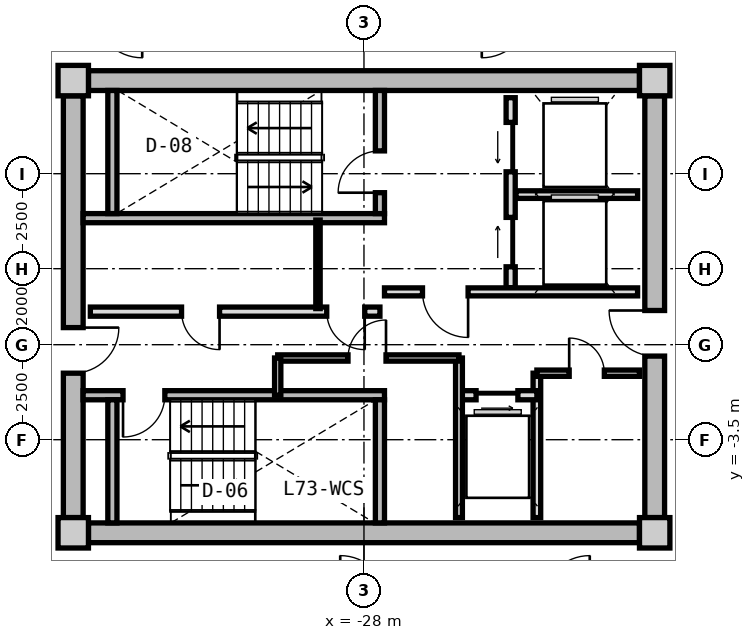
"""IFC4 building model, lengths in metres.
Left out: names, types, materials, properties, quantities, classifications, styles, units other than length and angle.
Written with IfcOpenShell. Run it as: python <this file> out.ifc"""

import sys

from ifc_helpers import new_model, si_unit, direction, frame, frame_2d, origin, origin_2d, place, context, subcontext, project, spatial, rectangle, extrude, source, transform, mapped, element, fill, save


model = new_model("IFC4")
c1 = context("Model", 3, precision=1e-05, world=origin(), true_north=direction((0.0, 1.0)))
c2 = subcontext(c1, "Body", "Model", "MODEL_VIEW")
j1 = project(units=[si_unit("LENGTHUNIT", "METRE"), si_unit("PLANEANGLEUNIT", "RADIAN")], contexts=[c1])
p1 = place(None, origin())
s1 = spatial("IfcSite", under=j1, at=p1, CompositionType="ELEMENT")
p2 = place(p1, origin())
s2 = spatial("IfcBuilding", under=s1, at=p2, CompositionType="ELEMENT")
p3 = place(p2, frame((0.0, 0.0, 235.25)))
s3 = spatial("IfcBuildingStorey", under=s2, at=p3, CompositionType="ELEMENT", Elevation=235.25)
m1 = source(origin(), c2, "Body", "SweptSolid", [
    extrude(rectangle(XDim=0.8, YDim=0.8, at=origin_2d()), origin(), (0.0, 0.0, 1.0), 3.05),
])
for number, where, z_axis, x_axis in (
    (1, (-35.65, -5.95, 0.0), (0.0, 0.0, 1.0), (1.0, 0.0, 0.0)),
    (2, (-20.35, -5.95, 0.0), (0.0, 0.0, 1.0), (1.0, 0.0, 0.0)),
    (3, (-20.35, 5.95, 0.0), (0.0, 0.0, 1.0), (1.0, 0.0, 0.0)),
    (4, (-35.65, 5.95, 0.0), (0.0, 0.0, 1.0), (1.0, 0.0, 0.0)),
):
    element("IfcColumn", number, at=place(p3, frame(where, z_axis=z_axis, x_axis=x_axis)), inside=s3, PredefinedType="COLUMN", context=c2, shape_type="MappedRepresentation", body=[
        mapped(m1, transform((0.0, 0.0, 0.0), x_axis=(1.0, 0.0, 0.0), y_axis=(0.0, 1.0, 0.0), z_axis=(0.0, 0.0, 1.0), scale=1.0)),
    ])
m2 = source(origin(), c2, "Body", "SweptSolid", [
    extrude(rectangle(XDim=14.5, YDim=0.52, at=frame_2d((7.25, 0.0))), origin(), (0.0, 0.0, 1.0), 2.81),
])
for number, where, z_axis, x_axis in (
    (5, (-35.25, 5.95, 0.0), (0.0, 0.0, 1.0), (1.0, 0.0, 0.0)),
    (6, (-20.75, -5.95, 0.0), (0.0, 0.0, 1.0), (-1.0, 0.0, 0.0)),
):
    element("IfcWall", number, at=place(p3, frame(where, z_axis=z_axis, x_axis=x_axis)), inside=s3, PredefinedType="SHEAR", context=c2, shape_type="MappedRepresentation", body=[
        mapped(m2, transform((0.0, 0.0, 0.0), x_axis=(1.0, 0.0, 0.0), y_axis=(0.0, 1.0, 0.0), z_axis=(0.0, 0.0, 1.0), scale=1.0)),
    ])
m3 = source(origin(), c2, "Body", "SweptSolid", [
    extrude(rectangle(XDim=11.1, YDim=0.52, at=frame_2d((5.55, 0.0))), origin(), (0.0, 0.0, 1.0), 2.81),
])
p4 = place(p3, frame((-35.65, -5.55, 0.0), z_axis=(0.0, 0.0, 1.0), x_axis=(0.0, 1.0, 0.0)))
e7 = element("IfcWall", 7, at=p4, inside=s3, PredefinedType="SHEAR", context=c2, shape_type="MappedRepresentation", body=[
    mapped(m3, transform((0.0, 0.0, 0.0), x_axis=(1.0, 0.0, 0.0), y_axis=(0.0, 1.0, 0.0), z_axis=(0.0, 0.0, 1.0), scale=1.0)),
])
p5 = place(p4, frame((3.8, 0.0, 0.0)))
e8 = element("IfcOpeningElement", 8, at=p5, cuts=e7, PredefinedType="OPENING", context=c2, shape_type="SweptSolid", body=[
    extrude(rectangle(XDim=1.2, YDim=2.15, at=frame_2d((0.6, 1.075))), frame((0.0, 0.27, 0.0), z_axis=(0.0, -1.0, 0.0), x_axis=(1.0, 0.0, 0.0)), (0.0, 0.0, 1.0), 0.54),
])
p6 = place(p3, frame((-20.35, 5.55, 0.0), z_axis=(0.0, 0.0, 1.0), x_axis=(0.0, -1.0, 0.0)))
e9 = element("IfcWall", 9, at=p6, inside=s3, PredefinedType="SHEAR", context=c2, shape_type="MappedRepresentation", body=[
    mapped(m3, transform((0.0, 0.0, 0.0), x_axis=(1.0, 0.0, 0.0), y_axis=(0.0, 1.0, 0.0), z_axis=(0.0, 0.0, 1.0), scale=1.0)),
])
p7 = place(p6, frame((5.65, 0.0, 0.0)))
e10 = element("IfcOpeningElement", 10, at=p7, cuts=e9, PredefinedType="OPENING", context=c2, shape_type="SweptSolid", body=[
    extrude(rectangle(XDim=1.2, YDim=2.15, at=frame_2d((0.6, 1.075))), frame((0.0, 0.27, 0.0), z_axis=(0.0, -1.0, 0.0), x_axis=(1.0, 0.0, 0.0)), (0.0, 0.0, 1.0), 0.54),
])
m4 = source(origin(), c2, "Body", "SweptSolid", [
    extrude(rectangle(XDim=7.93, YDim=0.24, at=frame_2d((3.965, 0.0))), origin(), (0.0, 0.0, 1.0), 2.81),
])
p8 = place(p3, frame((-35.39, 2.33, 0.0), z_axis=(0.0, 0.0, 1.0), x_axis=(1.0, 0.0, 0.0)))
e11 = element("IfcWall", 11, at=p8, inside=s3, PredefinedType="PARTITIONING", context=c2, shape_type="MappedRepresentation", body=[
    mapped(m4, transform((0.0, 0.0, 0.0), x_axis=(1.0, 0.0, 0.0), y_axis=(0.0, 1.0, 0.0), z_axis=(0.0, 0.0, 1.0), scale=1.0)),
])
m5 = source(origin(), c2, "Body", "SweptSolid", [
    extrude(rectangle(XDim=3.24, YDim=0.24, at=frame_2d((1.62, 0.0))), origin(), (0.0, 0.0, 1.0), 2.81),
])
p9 = place(p3, frame((-34.62, 2.45, 0.0), z_axis=(0.0, 0.0, 1.0), x_axis=(0.0, 1.0, 0.0)))
e12 = element("IfcWall", 12, at=p9, inside=s3, PredefinedType="PARTITIONING", context=c2, shape_type="MappedRepresentation", body=[
    mapped(m5, transform((0.0, 0.0, 0.0), x_axis=(1.0, 0.0, 0.0), y_axis=(0.0, 1.0, 0.0), z_axis=(0.0, 0.0, 1.0), scale=1.0)),
])
p10 = place(p3, frame((-27.58, 2.45, 0.0), z_axis=(0.0, 0.0, 1.0), x_axis=(0.0, 1.0, 0.0)))
e13 = element("IfcWall", 13, at=p10, inside=s3, PredefinedType="PARTITIONING", context=c2, shape_type="MappedRepresentation", body=[
    mapped(m5, transform((0.0, 0.0, 0.0), x_axis=(1.0, 0.0, 0.0), y_axis=(0.0, 1.0, 0.0), z_axis=(0.0, 0.0, 1.0), scale=1.0)),
])
p11 = place(p10, frame((0.55, 0.0, 0.0)))
e14 = element("IfcOpeningElement", 14, at=p11, cuts=e13, PredefinedType="OPENING", context=c2, shape_type="SweptSolid", body=[
    extrude(rectangle(XDim=1.1, YDim=2.15, at=frame_2d((0.55, 1.075))), frame((0.0, 0.13, 0.0), z_axis=(0.0, -1.0, 0.0), x_axis=(1.0, 0.0, 0.0)), (0.0, 0.0, 1.0), 0.26),
])
p12 = place(p3, frame((-35.39, -2.33, 0.0), z_axis=(0.0, 0.0, 1.0), x_axis=(1.0, 0.0, 0.0)))
e15 = element("IfcWall", 15, at=p12, inside=s3, PredefinedType="PARTITIONING", context=c2, shape_type="MappedRepresentation", body=[
    mapped(m4, transform((0.0, 0.0, 0.0), x_axis=(1.0, 0.0, 0.0), y_axis=(0.0, 1.0, 0.0), z_axis=(0.0, 0.0, 1.0), scale=1.0)),
])
p13 = place(p12, frame((1.05, 0.0, 0.0)))
e16 = element("IfcOpeningElement", 16, at=p13, cuts=e15, PredefinedType="OPENING", context=c2, shape_type="SweptSolid", body=[
    extrude(rectangle(XDim=1.1, YDim=2.15, at=frame_2d((0.55, 1.075))), frame((0.0, 0.13, 0.0), z_axis=(0.0, -1.0, 0.0), x_axis=(1.0, 0.0, 0.0)), (0.0, 0.0, 1.0), 0.26),
])
for number, where, z_axis, x_axis in (
    (17, (-34.62, -5.69, 0.0), (0.0, 0.0, 1.0), (0.0, 1.0, 0.0)),
    (18, (-27.58, -5.69, 0.0), (0.0, 0.0, 1.0), (0.0, 1.0, 0.0)),
):
    element("IfcWall", number, at=place(p3, frame(where, z_axis=z_axis, x_axis=x_axis)), inside=s3, PredefinedType="PARTITIONING", context=c2, shape_type="MappedRepresentation", body=[
        mapped(m5, transform((0.0, 0.0, 0.0), x_axis=(1.0, 0.0, 0.0), y_axis=(0.0, 1.0, 0.0), z_axis=(0.0, 0.0, 1.0), scale=1.0)),
    ])
m6 = source(origin(), c2, "Body", "SweptSolid", [
    extrude(rectangle(XDim=5.0, YDim=0.24, at=frame_2d((2.5, 0.0))), origin(), (0.0, 0.0, 1.0), 2.795),
])
p14 = place(p3, frame((-24.14, 0.5, 0.0), z_axis=(0.0, 0.0, 1.0), x_axis=(0.0, 1.0, 0.0)))
e19 = element("IfcWall", 19, at=p14, inside=s3, PredefinedType="PARTITIONING", context=c2, shape_type="MappedRepresentation", body=[
    mapped(m6, transform((0.0, 0.0, 0.0), x_axis=(1.0, 0.0, 0.0), y_axis=(0.0, 1.0, 0.0), z_axis=(0.0, 0.0, 1.0), scale=1.0)),
])
p15 = place(p14, frame((3.05, 0.0, 0.0)))
e20 = element("IfcOpeningElement", 20, at=p15, cuts=e19, PredefinedType="OPENING", context=c2, shape_type="SweptSolid", body=[
    extrude(rectangle(XDim=1.3, YDim=2.2, at=frame_2d((0.65, 1.1))), frame((0.0, 0.13, 0.0), z_axis=(0.0, -1.0, 0.0), x_axis=(1.0, 0.0, 0.0)), (0.0, 0.0, 1.0), 0.26),
])
p16 = place(p14, frame((0.55, 0.0, 0.0)))
e21 = element("IfcOpeningElement", 21, at=p16, cuts=e19, PredefinedType="OPENING", context=c2, shape_type="SweptSolid", body=[
    extrude(rectangle(XDim=1.3, YDim=2.2, at=frame_2d((0.65, 1.1))), frame((0.0, 0.13, 0.0), z_axis=(0.0, -1.0, 0.0), x_axis=(1.0, 0.0, 0.0)), (0.0, 0.0, 1.0), 0.26),
])
m7 = source(origin(), c2, "Body", "SweptSolid", [
    extrude(rectangle(XDim=3.2, YDim=0.2, at=frame_2d((1.6, 0.0))), origin(), (0.0, 0.0, 1.0), 2.795),
])
p17 = place(p3, frame((-24.0, 2.95, 0.0), z_axis=(0.0, 0.0, 1.0), x_axis=(1.0, 0.0, 0.0)))
e22 = element("IfcWall", 22, at=p17, inside=s3, PredefinedType="PARTITIONING", context=c2, shape_type="MappedRepresentation", body=[
    mapped(m7, transform((0.0, 0.0, 0.0), x_axis=(1.0, 0.0, 0.0), y_axis=(0.0, 1.0, 0.0), z_axis=(0.0, 0.0, 1.0), scale=1.0)),
])
m8 = source(origin(), c2, "Body", "SweptSolid", [
    extrude(rectangle(XDim=6.66, YDim=0.21, at=frame_2d((3.33, 0.0))), origin(), (0.0, 0.0, 1.0), 2.795),
])
p18 = place(p3, frame((-27.46, 0.39, 0.0), z_axis=(0.0, 0.0, 1.0), x_axis=(1.0, 0.0, 0.0)))
e23 = element("IfcWall", 23, at=p18, inside=s3, PredefinedType="PARTITIONING", context=c2, shape_type="MappedRepresentation", body=[
    mapped(m8, transform((0.0, 0.0, 0.0), x_axis=(1.0, 0.0, 0.0), y_axis=(0.0, 1.0, 0.0), z_axis=(0.0, 0.0, 1.0), scale=1.0)),
])
p19 = place(p18, frame((1.0, 0.0, 0.0)))
e24 = element("IfcOpeningElement", 24, at=p19, cuts=e23, PredefinedType="OPENING", context=c2, shape_type="SweptSolid", body=[
    extrude(rectangle(XDim=1.2, YDim=2.15, at=frame_2d((0.6, 1.075))), frame((0.0, 0.115, 0.0), z_axis=(0.0, -1.0, 0.0), x_axis=(1.0, 0.0, 0.0)), (0.0, 0.0, 1.0), 0.23),
])
m9 = source(origin(), c2, "Body", "SweptSolid", [
    extrude(rectangle(XDim=7.62, YDim=0.24, at=frame_2d((3.81, 0.0))), origin(), (0.0, 0.0, 1.0), 2.795),
])
p20 = place(p3, frame((-35.2, -0.13, 0.0), z_axis=(0.0, 0.0, 1.0), x_axis=(1.0, 0.0, 0.0)))
e25 = element("IfcWall", 25, at=p20, inside=s3, PredefinedType="PARTITIONING", context=c2, shape_type="MappedRepresentation", body=[
    mapped(m9, transform((0.0, 0.0, 0.0), x_axis=(1.0, 0.0, 0.0), y_axis=(0.0, 1.0, 0.0), z_axis=(0.0, 0.0, 1.0), scale=1.0)),
])
p21 = place(p20, frame((6.22, 0.0, 0.0)))
e26 = element("IfcOpeningElement", 26, at=p21, cuts=e25, PredefinedType="OPENING", context=c2, shape_type="SweptSolid", body=[
    extrude(rectangle(XDim=1.0, YDim=2.1, at=frame_2d((0.5, 1.05))), frame((0.0, 0.13, 0.0), z_axis=(0.0, -1.0, 0.0), x_axis=(1.0, 0.0, 0.0)), (0.0, 0.0, 1.0), 0.26),
])
p22 = place(p20, frame((2.4, 0.0, 0.0)))
e27 = element("IfcOpeningElement", 27, at=p22, cuts=e25, PredefinedType="OPENING", context=c2, shape_type="SweptSolid", body=[
    extrude(rectangle(XDim=1.0, YDim=2.1, at=frame_2d((0.5, 1.05))), frame((0.0, 0.13, 0.0), z_axis=(0.0, -1.0, 0.0), x_axis=(1.0, 0.0, 0.0)), (0.0, 0.0, 1.0), 0.26),
])
m10 = source(origin(), c2, "Body", "SweptSolid", [
    extrude(rectangle(XDim=2.33, YDim=0.115, at=frame_2d((1.165, 0.0))), origin(), (0.0, 0.0, 1.0), 2.795),
])
p23 = place(p3, frame((-29.21, -0.05, 0.0), z_axis=(0.0, 0.0, 1.0), x_axis=(0.0, 1.0, 0.0)))
e28 = element("IfcWall", 28, at=p23, inside=s3, PredefinedType="PARTITIONING", context=c2, shape_type="MappedRepresentation", body=[
    mapped(m10, transform((0.0, 0.0, 0.0), x_axis=(1.0, 0.0, 0.0), y_axis=(0.0, 1.0, 0.0), z_axis=(0.0, 0.0, 1.0), scale=1.0)),
])
m11 = source(origin(), c2, "Body", "SweptSolid", [
    extrude(rectangle(XDim=3.8, YDim=0.2, at=frame_2d((1.9, 0.0))), origin(), (0.0, 0.0, 1.0), 2.795),
])
p24 = place(p3, frame((-23.45, -5.55, 0.0), z_axis=(0.0, 0.0, 1.0), x_axis=(0.0, 1.0, 0.0)))
e29 = element("IfcWall", 29, at=p24, inside=s3, PredefinedType="PARTITIONING", context=c2, shape_type="MappedRepresentation", body=[
    mapped(m11, transform((0.0, 0.0, 0.0), x_axis=(1.0, 0.0, 0.0), y_axis=(0.0, 1.0, 0.0), z_axis=(0.0, 0.0, 1.0), scale=1.0)),
])
m12 = source(origin(), c2, "Body", "SweptSolid", [
    extrude(rectangle(XDim=2.05, YDim=0.24, at=frame_2d((1.025, 0.0))), origin(), (0.0, 0.0, 1.0), 2.795),
])
p25 = place(p3, frame((-25.5, -2.33, 0.0), z_axis=(0.0, 0.0, 1.0), x_axis=(1.0, 0.0, 0.0)))
e30 = element("IfcWall", 30, at=p25, inside=s3, PredefinedType="PARTITIONING", context=c2, shape_type="MappedRepresentation", body=[
    mapped(m12, transform((0.0, 0.0, 0.0), x_axis=(1.0, 0.0, 0.0), y_axis=(0.0, 1.0, 0.0), z_axis=(0.0, 0.0, 1.0), scale=1.0)),
])
p26 = place(p25, frame((0.45, 0.0, 0.0)))
e31 = element("IfcOpeningElement", 31, at=p26, cuts=e30, PredefinedType="OPENING", context=c2, shape_type="SweptSolid", body=[
    extrude(rectangle(XDim=1.1, YDim=2.2, at=frame_2d((0.55, 1.1))), frame((0.0, 0.13, 0.0), z_axis=(0.0, -1.0, 0.0), x_axis=(1.0, 0.0, 0.0)), (0.0, 0.0, 1.0), 0.26),
])
m13 = source(origin(), c2, "Body", "SweptSolid", [
    extrude(rectangle(XDim=4.2, YDim=0.18, at=frame_2d((2.1, 0.0))), origin(), (0.0, 0.0, 1.0), 2.795),
])
p27 = place(p3, frame((-25.5, -5.55, 0.0), z_axis=(0.0, 0.0, 1.0), x_axis=(0.0, 1.0, 0.0)))
e32 = element("IfcWall", 32, at=p27, inside=s3, PredefinedType="PARTITIONING", context=c2, shape_type="MappedRepresentation", body=[
    mapped(m13, transform((0.0, 0.0, 0.0), x_axis=(1.0, 0.0, 0.0), y_axis=(0.0, 1.0, 0.0), z_axis=(0.0, 0.0, 1.0), scale=1.0)),
])
m14 = source(origin(), c2, "Body", "SweptSolid", [
    extrude(rectangle(XDim=4.77, YDim=0.165, at=frame_2d((2.385, 0.0))), origin(), (0.0, 0.0, 1.0), 2.795),
])
p28 = place(p3, frame((-30.27, -1.35, 0.0), z_axis=(0.0, 0.0, 1.0), x_axis=(1.0, 0.0, 0.0)))
e33 = element("IfcWall", 33, at=p28, inside=s3, PredefinedType="PARTITIONING", context=c2, shape_type="MappedRepresentation", body=[
    mapped(m14, transform((0.0, 0.0, 0.0), x_axis=(1.0, 0.0, 0.0), y_axis=(0.0, 1.0, 0.0), z_axis=(0.0, 0.0, 1.0), scale=1.0)),
])
p29 = place(p28, frame((1.85, 0.0, 0.0)))
e34 = element("IfcOpeningElement", 34, at=p29, cuts=e33, PredefinedType="OPENING", context=c2, shape_type="SweptSolid", body=[
    extrude(rectangle(XDim=1.0, YDim=2.1, at=frame_2d((0.5, 1.05))), frame((0.0, 0.093, 0.0), z_axis=(0.0, -1.0, 0.0), x_axis=(1.0, 0.0, 0.0)), (0.0, 0.0, 1.0), 0.185),
])
m15 = source(origin(), c2, "Body", "SweptSolid", [
    extrude(rectangle(XDim=0.98, YDim=0.165, at=frame_2d((0.49, 0.0))), origin(), (0.0, 0.0, 1.0), 2.795),
])
p30 = place(p3, frame((-30.27, -2.33, 0.0), z_axis=(0.0, 0.0, 1.0), x_axis=(0.0, 1.0, 0.0)))
e35 = element("IfcWall", 35, at=p30, inside=s3, PredefinedType="PARTITIONING", context=c2, shape_type="MappedRepresentation", body=[
    mapped(m15, transform((0.0, 0.0, 0.0), x_axis=(1.0, 0.0, 0.0), y_axis=(0.0, 1.0, 0.0), z_axis=(0.0, 0.0, 1.0), scale=1.0)),
])
m16 = source(origin(), c2, "Body", "SweptSolid", [
    extrude(rectangle(XDim=2.7, YDim=0.165, at=frame_2d((1.35, 0.0))), origin(), (0.0, 0.0, 1.0), 2.795),
])
p31 = place(p3, frame((-23.45, -1.75, 0.0), z_axis=(0.0, 0.0, 1.0), x_axis=(1.0, 0.0, 0.0)))
e36 = element("IfcWall", 36, at=p31, inside=s3, PredefinedType="PARTITIONING", context=c2, shape_type="MappedRepresentation", body=[
    mapped(m16, transform((0.0, 0.0, 0.0), x_axis=(1.0, 0.0, 0.0), y_axis=(0.0, 1.0, 0.0), z_axis=(0.0, 0.0, 1.0), scale=1.0)),
])
p32 = place(p31, frame((0.85, 0.0, 0.0)))
e37 = element("IfcOpeningElement", 37, at=p32, cuts=e36, PredefinedType="OPENING", context=c2, shape_type="SweptSolid", body=[
    extrude(rectangle(XDim=0.925, YDim=2.1, at=frame_2d((0.462, 1.05))), frame((0.0, 0.093, 0.0), z_axis=(0.0, -1.0, 0.0), x_axis=(1.0, 0.0, 0.0)), (0.0, 0.0, 1.0), 0.185),
])
m17 = source(origin(), c2, "Body", "SweptSolid", [
    extrude(rectangle(XDim=1.1, YDim=2.15, at=frame_2d((0.55, 1.075))), frame((0.0, 0.025, 0.0), z_axis=(0.0, -1.0, 0.0), x_axis=(1.0, 0.0, 0.0)), (0.0, 0.0, 1.0), 0.05),
])
p33 = place(p11, origin())
e38 = element("IfcDoor", 38, at=p33, inside=s3, OperationType="SINGLE_SWING_LEFT", PredefinedType="DOOR", context=c2, shape_type="MappedRepresentation", body=[
    mapped(m17, transform((0.0, 0.0, 0.0), x_axis=(1.0, 0.0, 0.0), y_axis=(0.0, 1.0, 0.0), z_axis=(0.0, 0.0, 1.0), scale=1.0)),
])
fill(e14, e38)
p34 = place(p13, frame((1.1, 0.0, 0.0), z_axis=(0.0, 0.0, 1.0), x_axis=(-1.0, 0.0, 0.0)))
e39 = element("IfcDoor", 39, at=p34, inside=s3, OperationType="SINGLE_SWING_RIGHT", PredefinedType="DOOR", context=c2, shape_type="MappedRepresentation", body=[
    mapped(m17, transform((0.0, 0.0, 0.0), x_axis=(1.0, 0.0, 0.0), y_axis=(0.0, 1.0, 0.0), z_axis=(0.0, 0.0, 1.0), scale=1.0)),
])
fill(e16, e39)
m18 = source(origin(), c2, "Body", "SweptSolid", [
    extrude(rectangle(XDim=1.3, YDim=2.2, at=frame_2d((0.65, 1.1))), frame((0.0, 0.025, 0.0), z_axis=(0.0, -1.0, 0.0), x_axis=(1.0, 0.0, 0.0)), (0.0, 0.0, 1.0), 0.05),
])
p35 = place(p15, origin())
e40 = element("IfcDoor", 40, at=p35, inside=s3, OperationType="SLIDING_TO_LEFT", PredefinedType="DOOR", context=c2, shape_type="MappedRepresentation", body=[
    mapped(m18, transform((0.0, 0.0, 0.0), x_axis=(1.0, 0.0, 0.0), y_axis=(0.0, 1.0, 0.0), z_axis=(0.0, 0.0, 1.0), scale=1.0)),
])
fill(e20, e40)
p36 = place(p16, origin())
e41 = element("IfcDoor", 41, at=p36, inside=s3, OperationType="SLIDING_TO_RIGHT", PredefinedType="DOOR", context=c2, shape_type="MappedRepresentation", body=[
    mapped(m18, transform((0.0, 0.0, 0.0), x_axis=(1.0, 0.0, 0.0), y_axis=(0.0, 1.0, 0.0), z_axis=(0.0, 0.0, 1.0), scale=1.0)),
])
fill(e21, e41)
m19 = source(origin(), c2, "Body", "SweptSolid", [
    extrude(rectangle(XDim=1.2, YDim=2.15, at=frame_2d((0.6, 1.075))), frame((0.0, 0.025, 0.0), z_axis=(0.0, -1.0, 0.0), x_axis=(1.0, 0.0, 0.0)), (0.0, 0.0, 1.0), 0.05),
])
p37 = place(p19, frame((1.2, 0.0, 0.0), z_axis=(0.0, 0.0, 1.0), x_axis=(-1.0, 0.0, 0.0)))
e42 = element("IfcDoor", 42, at=p37, inside=s3, OperationType="SINGLE_SWING_LEFT", PredefinedType="DOOR", context=c2, shape_type="MappedRepresentation", body=[
    mapped(m19, transform((0.0, 0.0, 0.0), x_axis=(1.0, 0.0, 0.0), y_axis=(0.0, 1.0, 0.0), z_axis=(0.0, 0.0, 1.0), scale=1.0)),
])
fill(e24, e42)
p38 = place(p5, frame((1.2, 0.0, 0.0), z_axis=(0.0, 0.0, 1.0), x_axis=(-1.0, 0.0, 0.0)))
e43 = element("IfcDoor", 43, at=p38, inside=s3, OperationType="SINGLE_SWING_LEFT", PredefinedType="DOOR", context=c2, shape_type="MappedRepresentation", body=[
    mapped(m19, transform((0.0, 0.0, 0.0), x_axis=(1.0, 0.0, 0.0), y_axis=(0.0, 1.0, 0.0), z_axis=(0.0, 0.0, 1.0), scale=1.0)),
])
fill(e8, e43)
p39 = place(p7, frame((1.2, 0.0, 0.0), z_axis=(0.0, 0.0, 1.0), x_axis=(-1.0, 0.0, 0.0)))
e44 = element("IfcDoor", 44, at=p39, inside=s3, OperationType="SINGLE_SWING_RIGHT", PredefinedType="DOOR", context=c2, shape_type="MappedRepresentation", body=[
    mapped(m19, transform((0.0, 0.0, 0.0), x_axis=(1.0, 0.0, 0.0), y_axis=(0.0, 1.0, 0.0), z_axis=(0.0, 0.0, 1.0), scale=1.0)),
])
fill(e10, e44)
m20 = source(origin(), c2, "Body", "SweptSolid", [
    extrude(rectangle(XDim=1.0, YDim=2.1, at=frame_2d((0.5, 1.05))), frame((0.0, 0.025, 0.0), z_axis=(0.0, -1.0, 0.0), x_axis=(1.0, 0.0, 0.0)), (0.0, 0.0, 1.0), 0.05),
])
p40 = place(p21, frame((1.0, 0.0, 0.0), z_axis=(0.0, 0.0, 1.0), x_axis=(-1.0, 0.0, 0.0)))
e45 = element("IfcDoor", 45, at=p40, inside=s3, OperationType="SINGLE_SWING_LEFT", PredefinedType="DOOR", context=c2, shape_type="MappedRepresentation", body=[
    mapped(m20, transform((0.0, 0.0, 0.0), x_axis=(1.0, 0.0, 0.0), y_axis=(0.0, 1.0, 0.0), z_axis=(0.0, 0.0, 1.0), scale=1.0)),
])
fill(e26, e45)
p41 = place(p22, frame((1.0, 0.0, 0.0), z_axis=(0.0, 0.0, 1.0), x_axis=(-1.0, 0.0, 0.0)))
e46 = element("IfcDoor", 46, at=p41, inside=s3, OperationType="SINGLE_SWING_LEFT", PredefinedType="DOOR", context=c2, shape_type="MappedRepresentation", body=[
    mapped(m20, transform((0.0, 0.0, 0.0), x_axis=(1.0, 0.0, 0.0), y_axis=(0.0, 1.0, 0.0), z_axis=(0.0, 0.0, 1.0), scale=1.0)),
])
fill(e27, e46)
m21 = source(origin(), c2, "Body", "SweptSolid", [
    extrude(rectangle(XDim=1.1, YDim=2.2, at=frame_2d((0.55, 1.1))), frame((0.0, 0.025, 0.0), z_axis=(0.0, -1.0, 0.0), x_axis=(1.0, 0.0, 0.0)), (0.0, 0.0, 1.0), 0.05),
])
p42 = place(p26, frame((1.1, 0.0, 0.0), z_axis=(0.0, 0.0, 1.0), x_axis=(-1.0, 0.0, 0.0)))
e47 = element("IfcDoor", 47, at=p42, inside=s3, OperationType="SLIDING_TO_RIGHT", PredefinedType="DOOR", context=c2, shape_type="MappedRepresentation", body=[
    mapped(m21, transform((0.0, 0.0, 0.0), x_axis=(1.0, 0.0, 0.0), y_axis=(0.0, 1.0, 0.0), z_axis=(0.0, 0.0, 1.0), scale=1.0)),
])
fill(e31, e47)
p43 = place(p29, origin())
e48 = element("IfcDoor", 48, at=p43, inside=s3, OperationType="SINGLE_SWING_RIGHT", PredefinedType="DOOR", context=c2, shape_type="MappedRepresentation", body=[
    mapped(m20, transform((0.0, 0.0, 0.0), x_axis=(1.0, 0.0, 0.0), y_axis=(0.0, 1.0, 0.0), z_axis=(0.0, 0.0, 1.0), scale=1.0)),
])
fill(e34, e48)
m22 = source(origin(), c2, "Body", "SweptSolid", [
    extrude(rectangle(XDim=0.925, YDim=2.1, at=frame_2d((0.462, 1.05))), frame((0.0, 0.025, 0.0), z_axis=(0.0, -1.0, 0.0), x_axis=(1.0, 0.0, 0.0)), (0.0, 0.0, 1.0), 0.05),
])
p44 = place(p32, origin())
e49 = element("IfcDoor", 49, at=p44, inside=s3, OperationType="SINGLE_SWING_LEFT", PredefinedType="DOOR", context=c2, shape_type="MappedRepresentation", body=[
    mapped(m22, transform((0.0, 0.0, 0.0), x_axis=(1.0, 0.0, 0.0), y_axis=(0.0, 1.0, 0.0), z_axis=(0.0, 0.0, 1.0), scale=1.0)),
])
fill(e37, e49)
save(model, sys.argv[1])
